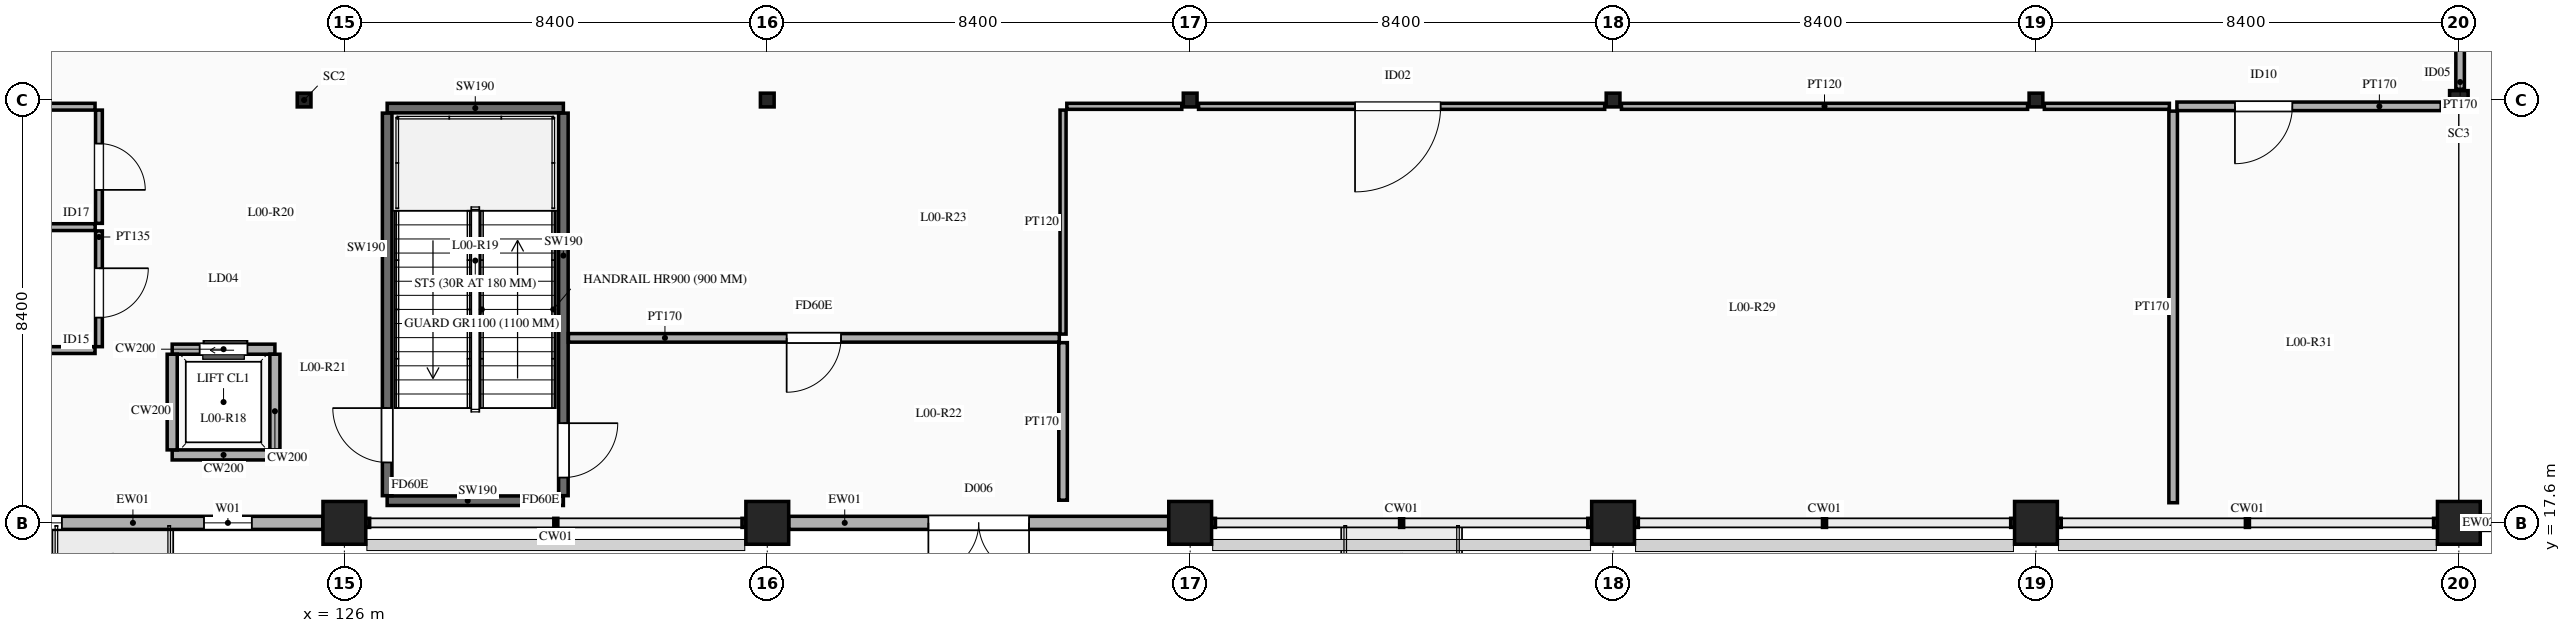
"""IFC4 building model, lengths in metres.
Left out: names, types, materials, properties, quantities, classifications, styles, units other than length and angle.
Written with IfcOpenShell. Run it as: python <this file> out.ifc"""

import sys

from ifc_helpers import new_model, si_unit, direction, frame, frame_2d, origin, origin_2d, place, context, subcontext, project, spatial, rectangle, hollow_circle, i_section, extrude, element, fill, save


model = new_model("IFC4")
c1 = context("Model", 3, precision=1e-05, world=origin(), true_north=direction((0.0, 1.0)))
c2 = subcontext(c1, "Body", "Model", "MODEL_VIEW")
j1 = project(units=[si_unit("LENGTHUNIT", "METRE"), si_unit("PLANEANGLEUNIT", "RADIAN")], contexts=[c1])
p1 = place(None, origin())
s1 = spatial("IfcSite", under=j1, at=p1, CompositionType="ELEMENT")
p2 = place(p1, origin())
s2 = spatial("IfcBuilding", under=s1, at=p2, CompositionType="ELEMENT")
p3 = place(p2, origin())
s3 = spatial("IfcBuildingStorey", under=s2, at=p3, CompositionType="ELEMENT", Elevation=0.0)
for number, where, z_axis, x_axis in (
    (1, (126.0, 17.6, 0.0), (0.0, 0.0, 1.0), (1.0, 0.0, 0.0)),
    (2, (134.4, 17.6, 0.0), (0.0, 0.0, 1.0), (1.0, 0.0, 0.0)),
    (3, (142.8, 17.6, 0.0), (0.0, 0.0, 1.0), (1.0, 0.0, 0.0)),
    (4, (151.2, 17.6, 0.0), (0.0, 0.0, 1.0), (1.0, 0.0, 0.0)),
    (5, (159.6, 17.6, 0.0), (0.0, 0.0, 1.0), (1.0, 0.0, 0.0)),
    (6, (168.0, 17.6, 0.0), (0.0, 0.0, 1.0), (1.0, 0.0, 0.0)),
):
    element("IfcColumn", number, at=place(p3, frame(where, z_axis=z_axis, x_axis=x_axis)), inside=s3, PredefinedType="COLUMN", context=c2, shape_type="SweptSolid", body=[
        extrude(rectangle(XDim=0.85, YDim=0.85, at=origin_2d()), origin(), (0.0, 0.0, 1.0), 5.4),
    ])
p4 = place(p3, frame((168.0, 26.0, 0.0), z_axis=(0.0, 0.0, 1.0), x_axis=(1.0, 0.0, 0.0)))
e7 = element("IfcColumn", 7, at=p4, inside=s3, PredefinedType="COLUMN", context=c2, shape_type="SweptSolid", body=[
    extrude(i_section(OverallWidth=0.373, OverallDepth=0.368, WebThickness=0.014, FlangeThickness=0.024, FilletRadius=0.015, at=origin_2d()), origin(), (0.0, 0.0, 1.0), 5.4),
])
for number, where, z_axis, x_axis in (
    (8, (125.2, 26.0, 0.0), (0.0, 0.0, 1.0), (1.0, 0.0, 0.0)),
    (9, (134.4, 26.0, 0.0), (0.0, 0.0, 1.0), (1.0, 0.0, 0.0)),
    (10, (142.8, 26.0, 0.0), (0.0, 0.0, 1.0), (1.0, 0.0, 0.0)),
    (11, (151.2, 26.0, 0.0), (0.0, 0.0, 1.0), (1.0, 0.0, 0.0)),
    (12, (159.6, 26.0, 0.0), (0.0, 0.0, 1.0), (1.0, 0.0, 0.0)),
):
    element("IfcColumn", number, at=place(p3, frame(where, z_axis=z_axis, x_axis=x_axis)), inside=s3, PredefinedType="COLUMN", context=c2, shape_type="SweptSolid", body=[
        extrude(hollow_circle(Radius=0.136, WallThickness=0.01, at=origin_2d()), origin(), (0.0, 0.0, 1.0), 5.2),
    ])
p5 = place(p3, frame((118.027, 17.6, 0.0), z_axis=(0.0, 0.0, 1.0), x_axis=(1.0, 0.0, 0.0)))
e13 = element("IfcWall", 13, at=p5, inside=s3, PredefinedType="SOLIDWALL", context=c2, shape_type="SweptSolid", body=[
    extrude(rectangle(XDim=7.546, YDim=0.26, at=frame_2d((3.773, 0.0))), origin(), (0.0, 0.0, 1.0), 4.45),
])
p6 = place(p5, frame((1.412, 0.0, 0.9)))
e14 = element("IfcOpeningElement", 14, at=p6, cuts=e13, PredefinedType="OPENING", context=c2, shape_type="SweptSolid", body=[
    extrude(rectangle(XDim=0.95, YDim=1.8, at=frame_2d((0.475, 0.9))), frame((0.0, 0.14, 0.0), z_axis=(0.0, -1.0, 0.0), x_axis=(1.0, 0.0, 0.0)), (0.0, 0.0, 1.0), 0.28),
])
p7 = place(p5, frame((5.185, 0.0, 0.9)))
e15 = element("IfcOpeningElement", 15, at=p7, cuts=e13, PredefinedType="OPENING", context=c2, shape_type="SweptSolid", body=[
    extrude(rectangle(XDim=0.95, YDim=1.8, at=frame_2d((0.475, 0.9))), frame((0.0, 0.14, 0.0), z_axis=(0.0, -1.0, 0.0), x_axis=(1.0, 0.0, 0.0)), (0.0, 0.0, 1.0), 0.28),
])
p8 = place(p3, frame((134.827, 17.6, 0.0), z_axis=(0.0, 0.0, 1.0), x_axis=(1.0, 0.0, 0.0)))
e16 = element("IfcWall", 16, at=p8, inside=s3, PredefinedType="SOLIDWALL", context=c2, shape_type="SweptSolid", body=[
    extrude(rectangle(XDim=7.546, YDim=0.26, at=frame_2d((3.773, 0.0))), origin(), (0.0, 0.0, 1.0), 4.45),
])
p9 = place(p8, frame((2.773, 0.0, 0.0)))
e17 = element("IfcOpeningElement", 17, at=p9, cuts=e16, PredefinedType="OPENING", context=c2, shape_type="SweptSolid", body=[
    extrude(rectangle(XDim=2.0, YDim=2.4, at=frame_2d((1.0, 1.2))), frame((0.0, 0.14, 0.0), z_axis=(0.0, -1.0, 0.0), x_axis=(1.0, 0.0, 0.0)), (0.0, 0.0, 1.0), 0.28),
])
p10 = place(p3, frame((168.427, 17.6, 0.0), z_axis=(0.0, 0.0, 1.0), x_axis=(1.0, 0.0, 0.0)))
e18 = element("IfcWall", 18, at=p10, inside=s3, PredefinedType="SOLIDWALL", context=c2, shape_type="SweptSolid", body=[
    extrude(rectangle(XDim=2.846, YDim=0.3, at=frame_2d((1.423, 0.0))), origin(), (0.0, 0.0, 1.0), 4.45),
])
p11 = place(p10, frame((0.798, 0.0, 0.9)))
e19 = element("IfcOpeningElement", 19, at=p11, cuts=e18, PredefinedType="OPENING", context=c2, shape_type="SweptSolid", body=[
    extrude(rectangle(XDim=1.25, YDim=1.8, at=frame_2d((0.625, 0.9))), frame((0.0, 0.16, 0.0), z_axis=(0.0, -1.0, 0.0), x_axis=(1.0, 0.0, 0.0)), (0.0, 0.0, 1.0), 0.32),
])
p12 = place(p3, frame((122.58, 21.05, 0.0), z_axis=(0.0, 0.0, 1.0), x_axis=(1.0, 0.0, 0.0)))
e20 = element("IfcWall", 20, at=p12, inside=s3, PredefinedType="SOLIDWALL", context=c2, shape_type="SweptSolid", body=[
    extrude(rectangle(XDim=2.04, YDim=0.2, at=frame_2d((1.02, 0.0))), origin(), (0.0, 0.0, 1.0), 5.2),
])
p13 = place(p12, frame((0.545, 0.0, 0.0)))
e21 = element("IfcOpeningElement", 21, at=p13, cuts=e20, PredefinedType="OPENING", context=c2, shape_type="SweptSolid", body=[
    extrude(rectangle(XDim=0.95, YDim=2.15, at=frame_2d((0.475, 1.075))), frame((0.0, 0.11, 0.0), z_axis=(0.0, -1.0, 0.0), x_axis=(1.0, 0.0, 0.0)), (0.0, 0.0, 1.0), 0.22),
])
p14 = place(p3, frame((122.58, 18.95, 0.0), z_axis=(0.0, 0.0, 1.0), x_axis=(1.0, 0.0, 0.0)))
e22 = element("IfcWall", 22, at=p14, inside=s3, PredefinedType="SOLIDWALL", context=c2, shape_type="SweptSolid", body=[
    extrude(rectangle(XDim=2.04, YDim=0.2, at=frame_2d((1.02, 0.0))), origin(), (0.0, 0.0, 1.0), 5.2),
])
for number, where, z_axis, x_axis in (
    (23, (122.58, 19.05, 0.0), (0.0, 0.0, 1.0), (0.0, 1.0, 0.0)),
    (24, (124.62, 19.05, 0.0), (0.0, 0.0, 1.0), (0.0, 1.0, 0.0)),
):
    element("IfcWall", number, at=place(p3, frame(where, z_axis=z_axis, x_axis=x_axis)), inside=s3, PredefinedType="SOLIDWALL", context=c2, shape_type="SweptSolid", body=[
        extrude(rectangle(XDim=1.9, YDim=0.2, at=frame_2d((0.95, 0.0))), origin(), (0.0, 0.0, 1.0), 5.2),
    ])
for number, where, z_axis, x_axis in (
    (25, (126.85, 18.04, 0.0), (0.0, 0.0, 1.0), (1.0, 0.0, 0.0)),
    (26, (126.85, 25.84, 0.0), (0.0, 0.0, 1.0), (1.0, 0.0, 0.0)),
):
    element("IfcWall", number, at=place(p3, frame(where, z_axis=z_axis, x_axis=x_axis)), inside=s3, PredefinedType="SOLIDWALL", context=c2, shape_type="SweptSolid", body=[
        extrude(rectangle(XDim=3.5, YDim=0.19, at=frame_2d((1.75, 0.0))), origin(), (0.0, 0.0, 1.0), 5.2),
    ])
p15 = place(p3, frame((126.85, 18.14, 0.0), z_axis=(0.0, 0.0, 1.0), x_axis=(0.0, 1.0, 0.0)))
e27 = element("IfcWall", 27, at=p15, inside=s3, PredefinedType="SOLIDWALL", context=c2, shape_type="SweptSolid", body=[
    extrude(rectangle(XDim=7.6, YDim=0.19, at=frame_2d((3.8, 0.0))), origin(), (0.0, 0.0, 1.0), 5.2),
])
p16 = place(p15, frame((0.66, 0.0, 0.0)))
e28 = element("IfcOpeningElement", 28, at=p16, cuts=e27, PredefinedType="OPENING", context=c2, shape_type="SweptSolid", body=[
    extrude(rectangle(XDim=1.08, YDim=2.15, at=frame_2d((0.54, 1.075))), frame((0.0, 0.105, 0.0), z_axis=(0.0, -1.0, 0.0), x_axis=(1.0, 0.0, 0.0)), (0.0, 0.0, 1.0), 0.21),
])
p17 = place(p3, frame((130.35, 18.14, 0.0), z_axis=(0.0, 0.0, 1.0), x_axis=(0.0, 1.0, 0.0)))
e29 = element("IfcWall", 29, at=p17, inside=s3, PredefinedType="SOLIDWALL", context=c2, shape_type="SweptSolid", body=[
    extrude(rectangle(XDim=7.6, YDim=0.19, at=frame_2d((3.8, 0.0))), origin(), (0.0, 0.0, 1.0), 5.2),
])
p18 = place(p17, frame((0.36, 0.0, 0.0)))
e30 = element("IfcOpeningElement", 30, at=p18, cuts=e29, PredefinedType="OPENING", context=c2, shape_type="SweptSolid", body=[
    extrude(rectangle(XDim=1.08, YDim=2.15, at=frame_2d((0.54, 1.075))), frame((0.0, 0.105, 0.0), z_axis=(0.0, -1.0, 0.0), x_axis=(1.0, 0.0, 0.0)), (0.0, 0.0, 1.0), 0.21),
])
p19 = place(p3, frame((121.125, 21.1, 0.0), z_axis=(0.0, 0.0, 1.0), x_axis=(0.0, 1.0, 0.0)))
e31 = element("IfcWall", 31, at=p19, inside=s3, PredefinedType="PARTITIONING", context=c2, shape_type="SweptSolid", body=[
    extrude(rectangle(XDim=2.3, YDim=0.135, at=frame_2d((1.15, 0.0))), origin(), (0.0, 0.0, 1.0), 4.35),
])
p20 = place(p19, frame((0.578, 0.0, 0.0)))
e32 = element("IfcOpeningElement", 32, at=p20, cuts=e31, PredefinedType="OPENING", context=c2, shape_type="SweptSolid", body=[
    extrude(rectangle(XDim=0.98, YDim=2.15, at=frame_2d((0.49, 1.075))), frame((0.0, 0.077, 0.0), z_axis=(0.0, -1.0, 0.0), x_axis=(1.0, 0.0, 0.0)), (0.0, 0.0, 1.0), 0.155),
])
p21 = place(p3, frame((121.125, 23.55, 0.0), z_axis=(0.0, 0.0, 1.0), x_axis=(0.0, 1.0, 0.0)))
e33 = element("IfcWall", 33, at=p21, inside=s3, PredefinedType="PARTITIONING", context=c2, shape_type="SweptSolid", body=[
    extrude(rectangle(XDim=2.25, YDim=0.135, at=frame_2d((1.125, 0.0))), origin(), (0.0, 0.0, 1.0), 4.35),
])
p22 = place(p21, frame((0.665, 0.0, 0.0)))
e34 = element("IfcOpeningElement", 34, at=p22, cuts=e33, PredefinedType="OPENING", context=c2, shape_type="SweptSolid", body=[
    extrude(rectangle(XDim=0.92, YDim=2.12, at=frame_2d((0.46, 1.06))), frame((0.0, 0.077, 0.0), z_axis=(0.0, -1.0, 0.0), x_axis=(1.0, 0.0, 0.0)), (0.0, 0.0, 1.0), 0.155),
])
p23 = place(p3, frame((130.45, 21.275, 0.0), z_axis=(0.0, 0.0, 1.0), x_axis=(1.0, 0.0, 0.0)))
e35 = element("IfcWall", 35, at=p23, inside=s3, PredefinedType="PARTITIONING", context=c2, shape_type="SweptSolid", body=[
    extrude(rectangle(XDim=9.75, YDim=0.17, at=frame_2d((4.875, 0.0))), origin(), (0.0, 0.0, 1.0), 4.35),
])
p24 = place(p23, frame((4.335, 0.0, 0.0)))
e36 = element("IfcOpeningElement", 36, at=p24, cuts=e35, PredefinedType="OPENING", context=c2, shape_type="SweptSolid", body=[
    extrude(rectangle(XDim=1.08, YDim=2.15, at=frame_2d((0.54, 1.075))), frame((0.0, 0.095, 0.0), z_axis=(0.0, -1.0, 0.0), x_axis=(1.0, 0.0, 0.0)), (0.0, 0.0, 1.0), 0.19),
])
p25 = place(p3, frame((140.275, 18.05, 0.0), z_axis=(0.0, 0.0, 1.0), x_axis=(0.0, 1.0, 0.0)))
e37 = element("IfcWall", 37, at=p25, inside=s3, PredefinedType="PARTITIONING", context=c2, shape_type="SweptSolid", body=[
    extrude(rectangle(XDim=3.13, YDim=0.17, at=frame_2d((1.565, 0.0))), origin(), (0.0, 0.0, 1.0), 4.35),
])
p26 = place(p3, frame((140.275, 21.35, 0.0), z_axis=(0.0, 0.0, 1.0), x_axis=(0.0, 1.0, 0.0)))
e38 = element("IfcWall", 38, at=p26, inside=s3, PredefinedType="PARTITIONING", context=c2, shape_type="SweptSolid", body=[
    extrude(rectangle(XDim=4.45, YDim=0.12, at=frame_2d((2.225, 0.0))), origin(), (0.0, 0.0, 1.0), 4.35),
])
p27 = place(p3, frame((118.0, 23.475, 0.0), z_axis=(0.0, 0.0, 1.0), x_axis=(1.0, 0.0, 0.0)))
e39 = element("IfcWall", 39, at=p27, inside=s3, PredefinedType="PARTITIONING", context=c2, shape_type="SweptSolid", body=[
    extrude(rectangle(XDim=3.05, YDim=0.135, at=frame_2d((1.525, 0.0))), origin(), (0.0, 0.0, 1.0), 4.35),
])
p28 = place(p3, frame((140.35, 25.875, 0.0), z_axis=(0.0, 0.0, 1.0), x_axis=(1.0, 0.0, 0.0)))
e40 = element("IfcWall", 40, at=p28, inside=s3, PredefinedType="PARTITIONING", context=c2, shape_type="SweptSolid", body=[
    extrude(rectangle(XDim=2.283, YDim=0.12, at=frame_2d((1.142, 0.0))), origin(), (0.0, 0.0, 1.0), 4.35),
])
p29 = place(p3, frame((142.967, 25.875, 0.0), z_axis=(0.0, 0.0, 1.0), x_axis=(1.0, 0.0, 0.0)))
e41 = element("IfcWall", 41, at=p29, inside=s3, PredefinedType="PARTITIONING", context=c2, shape_type="SweptSolid", body=[
    extrude(rectangle(XDim=8.067, YDim=0.12, at=frame_2d((4.033, 0.0))), origin(), (0.0, 0.0, 1.0), 4.35),
])
p30 = place(p29, frame((3.108, 0.0, 0.0)))
e42 = element("IfcOpeningElement", 42, at=p30, cuts=e41, PredefinedType="OPENING", context=c2, shape_type="SweptSolid", body=[
    extrude(rectangle(XDim=1.7, YDim=2.4, at=frame_2d((0.85, 1.2))), frame((0.0, 0.07, 0.0), z_axis=(0.0, -1.0, 0.0), x_axis=(1.0, 0.0, 0.0)), (0.0, 0.0, 1.0), 0.14),
])
p31 = place(p3, frame((151.366, 25.875, 0.0), z_axis=(0.0, 0.0, 1.0), x_axis=(1.0, 0.0, 0.0)))
e43 = element("IfcWall", 43, at=p31, inside=s3, PredefinedType="PARTITIONING", context=c2, shape_type="SweptSolid", body=[
    extrude(rectangle(XDim=8.067, YDim=0.12, at=frame_2d((4.034, 0.0))), origin(), (0.0, 0.0, 1.0), 4.35),
])
p32 = place(p3, frame((159.767, 25.875, 0.0), z_axis=(0.0, 0.0, 1.0), x_axis=(1.0, 0.0, 0.0)))
e44 = element("IfcWall", 44, at=p32, inside=s3, PredefinedType="PARTITIONING", context=c2, shape_type="SweptSolid", body=[
    extrude(rectangle(XDim=2.483, YDim=0.12, at=frame_2d((1.242, 0.0))), origin(), (0.0, 0.0, 1.0), 4.35),
])
p33 = place(p3, frame((162.4, 25.875, 0.0), z_axis=(0.0, 0.0, 1.0), x_axis=(1.0, 0.0, 0.0)))
e45 = element("IfcWall", 45, at=p33, inside=s3, PredefinedType="PARTITIONING", context=c2, shape_type="SweptSolid", body=[
    extrude(rectangle(XDim=5.25, YDim=0.17, at=frame_2d((2.625, 0.0))), origin(), (0.0, 0.0, 1.0), 4.35),
])
p34 = place(p33, frame((1.153, 0.0, 0.0)))
e46 = element("IfcOpeningElement", 46, at=p34, cuts=e45, PredefinedType="OPENING", context=c2, shape_type="SweptSolid", body=[
    extrude(rectangle(XDim=1.14, YDim=2.22, at=frame_2d((0.57, 1.11))), frame((0.0, 0.095, 0.0), z_axis=(0.0, -1.0, 0.0), x_axis=(1.0, 0.0, 0.0)), (0.0, 0.0, 1.0), 0.19),
])
p35 = place(p3, frame((168.025, 26.214, 0.0), z_axis=(0.0, 0.0, 1.0), x_axis=(0.0, 1.0, 0.0)))
e47 = element("IfcWall", 47, at=p35, inside=s3, PredefinedType="PARTITIONING", context=c2, shape_type="SweptSolid", body=[
    extrude(rectangle(XDim=2.436, YDim=0.17, at=frame_2d((1.218, 0.0))), origin(), (0.0, 0.0, 1.0), 4.35),
])
p36 = place(p35, frame((0.786, 0.0, 0.0)))
e48 = element("IfcOpeningElement", 48, at=p36, cuts=e47, PredefinedType="OPENING", context=c2, shape_type="SweptSolid", body=[
    extrude(rectangle(XDim=1.4, YDim=2.25, at=frame_2d((0.7, 1.125))), frame((0.0, 0.095, 0.0), z_axis=(0.0, -1.0, 0.0), x_axis=(1.0, 0.0, 0.0)), (0.0, 0.0, 1.0), 0.19),
])
p37 = place(p3, frame((162.325, 18.0, 0.0), z_axis=(0.0, 0.0, 1.0), x_axis=(0.0, 1.0, 0.0)))
e49 = element("IfcWall", 49, at=p37, inside=s3, PredefinedType="PARTITIONING", context=c2, shape_type="SweptSolid", body=[
    extrude(rectangle(XDim=7.78, YDim=0.17, at=frame_2d((3.89, 0.0))), origin(), (0.0, 0.0, 1.0), 4.35),
])
for number, where, z_axis, x_axis in (
    (50, (118.0, 21.032, 0.0), (0.0, 0.0, 1.0), (1.0, 0.0, 0.0)),
    (51, (118.0, 25.867, 0.0), (0.0, 0.0, 1.0), (1.0, 0.0, 0.0)),
):
    element("IfcWall", number, at=place(p3, frame(where, z_axis=z_axis, x_axis=x_axis)), inside=s3, PredefinedType="PARTITIONING", context=c2, shape_type="SweptSolid", body=[
        extrude(rectangle(XDim=3.048, YDim=0.135, at=frame_2d((1.524, 0.0))), origin(), (0.0, 0.0, 1.0), 4.35),
    ])
p38 = place(p6, origin())
e52 = element("IfcWindow", 52, at=p38, inside=s3, PartitioningType="SINGLE_PANEL", PredefinedType="WINDOW", context=c2, shape_type="SweptSolid", body=[
    extrude(rectangle(XDim=0.95, YDim=1.8, at=frame_2d((0.475, 0.9))), frame((0.0, 0.03, 0.0), z_axis=(0.0, -1.0, 0.0), x_axis=(1.0, 0.0, 0.0)), (0.0, 0.0, 1.0), 0.06),
])
fill(e14, e52)
p39 = place(p7, origin())
e53 = element("IfcWindow", 53, at=p39, inside=s3, PartitioningType="SINGLE_PANEL", PredefinedType="WINDOW", context=c2, shape_type="SweptSolid", body=[
    extrude(rectangle(XDim=0.95, YDim=1.8, at=frame_2d((0.475, 0.9))), frame((0.0, 0.03, 0.0), z_axis=(0.0, -1.0, 0.0), x_axis=(1.0, 0.0, 0.0)), (0.0, 0.0, 1.0), 0.06),
])
fill(e15, e53)
p40 = place(p9, frame((2.0, 0.0, 0.0), z_axis=(0.0, 0.0, 1.0), x_axis=(-1.0, 0.0, 0.0)))
e54 = element("IfcDoor", 54, at=p40, inside=s3, OperationType="DOUBLE_DOOR_SINGLE_SWING", PredefinedType="DOOR", context=c2, shape_type="SweptSolid", body=[
    extrude(rectangle(XDim=2.0, YDim=2.4, at=frame_2d((1.0, 1.2))), frame((0.0, 0.025, 0.0), z_axis=(0.0, -1.0, 0.0), x_axis=(1.0, 0.0, 0.0)), (0.0, 0.0, 1.0), 0.05),
])
fill(e17, e54)
p41 = place(p13, origin())
e55 = element("IfcDoor", 55, at=p41, inside=s3, OperationType="SLIDING_TO_LEFT", PredefinedType="DOOR", context=c2, shape_type="SweptSolid", body=[
    extrude(rectangle(XDim=0.95, YDim=2.15, at=frame_2d((0.475, 1.075))), frame((0.0, 0.025, 0.0), z_axis=(0.0, -1.0, 0.0), x_axis=(1.0, 0.0, 0.0)), (0.0, 0.0, 1.0), 0.05),
])
fill(e21, e55)
p42 = place(p18, frame((1.08, 0.0, 0.0), z_axis=(0.0, 0.0, 1.0), x_axis=(-1.0, 0.0, 0.0)))
e56 = element("IfcDoor", 56, at=p42, inside=s3, OperationType="SINGLE_SWING_LEFT", PredefinedType="DOOR", context=c2, shape_type="SweptSolid", body=[
    extrude(rectangle(XDim=1.08, YDim=2.15, at=frame_2d((0.54, 1.075))), frame((0.0, 0.025, 0.0), z_axis=(0.0, -1.0, 0.0), x_axis=(1.0, 0.0, 0.0)), (0.0, 0.0, 1.0), 0.05),
])
fill(e30, e56)
p43 = place(p16, origin())
e57 = element("IfcDoor", 57, at=p43, inside=s3, OperationType="SINGLE_SWING_RIGHT", PredefinedType="DOOR", context=c2, shape_type="SweptSolid", body=[
    extrude(rectangle(XDim=1.08, YDim=2.15, at=frame_2d((0.54, 1.075))), frame((0.0, 0.025, 0.0), z_axis=(0.0, -1.0, 0.0), x_axis=(1.0, 0.0, 0.0)), (0.0, 0.0, 1.0), 0.05),
])
fill(e28, e57)
p44 = place(p20, frame((0.98, 0.0, 0.0), z_axis=(0.0, 0.0, 1.0), x_axis=(-1.0, 0.0, 0.0)))
e58 = element("IfcDoor", 58, at=p44, inside=s3, OperationType="SINGLE_SWING_LEFT", PredefinedType="DOOR", context=c2, shape_type="SweptSolid", body=[
    extrude(rectangle(XDim=0.98, YDim=2.15, at=frame_2d((0.49, 1.075))), frame((0.0, 0.025, 0.0), z_axis=(0.0, -1.0, 0.0), x_axis=(1.0, 0.0, 0.0)), (0.0, 0.0, 1.0), 0.05),
])
fill(e32, e58)
p45 = place(p22, frame((0.92, 0.0, 0.0), z_axis=(0.0, 0.0, 1.0), x_axis=(-1.0, 0.0, 0.0)))
e59 = element("IfcDoor", 59, at=p45, inside=s3, OperationType="SINGLE_SWING_RIGHT", PredefinedType="DOOR", context=c2, shape_type="SweptSolid", body=[
    extrude(rectangle(XDim=0.92, YDim=2.12, at=frame_2d((0.46, 1.06))), frame((0.0, 0.025, 0.0), z_axis=(0.0, -1.0, 0.0), x_axis=(1.0, 0.0, 0.0)), (0.0, 0.0, 1.0), 0.05),
])
fill(e34, e59)
p46 = place(p30, frame((1.7, 0.0, 0.0), z_axis=(0.0, 0.0, 1.0), x_axis=(-1.0, 0.0, 0.0)))
e60 = element("IfcDoor", 60, at=p46, inside=s3, OperationType="SINGLE_SWING_RIGHT", PredefinedType="DOOR", context=c2, shape_type="SweptSolid", body=[
    extrude(rectangle(XDim=1.7, YDim=2.4, at=frame_2d((0.85, 1.2))), frame((0.0, 0.025, 0.0), z_axis=(0.0, -1.0, 0.0), x_axis=(1.0, 0.0, 0.0)), (0.0, 0.0, 1.0), 0.05),
])
fill(e42, e60)
p47 = place(p34, frame((1.14, 0.0, 0.0), z_axis=(0.0, 0.0, 1.0), x_axis=(-1.0, 0.0, 0.0)))
e61 = element("IfcDoor", 61, at=p47, inside=s3, OperationType="SINGLE_SWING_RIGHT", PredefinedType="DOOR", context=c2, shape_type="SweptSolid", body=[
    extrude(rectangle(XDim=1.14, YDim=2.22, at=frame_2d((0.57, 1.11))), frame((0.0, 0.025, 0.0), z_axis=(0.0, -1.0, 0.0), x_axis=(1.0, 0.0, 0.0)), (0.0, 0.0, 1.0), 0.05),
])
fill(e46, e61)
p48 = place(p24, frame((1.08, 0.0, 0.0), z_axis=(0.0, 0.0, 1.0), x_axis=(-1.0, 0.0, 0.0)))
e62 = element("IfcDoor", 62, at=p48, inside=s3, OperationType="SINGLE_SWING_RIGHT", PredefinedType="DOOR", context=c2, shape_type="SweptSolid", body=[
    extrude(rectangle(XDim=1.08, YDim=2.15, at=frame_2d((0.54, 1.075))), frame((0.0, 0.025, 0.0), z_axis=(0.0, -1.0, 0.0), x_axis=(1.0, 0.0, 0.0)), (0.0, 0.0, 1.0), 0.05),
])
fill(e36, e62)
save(model, sys.argv[1])
